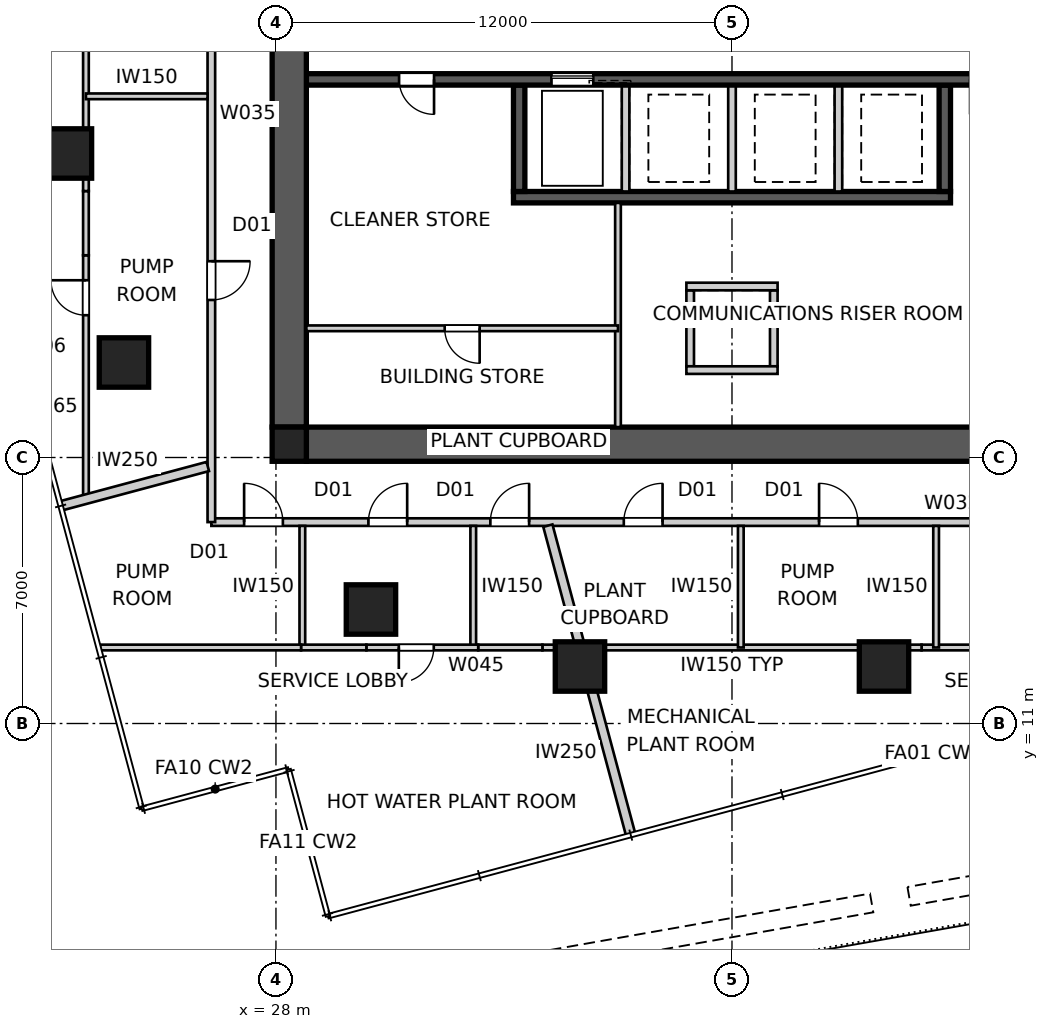
"""IFC4 building model, lengths in metres.
Left out: names, types, materials, properties, quantities, classifications, styles, units other than length and angle.
Written with IfcOpenShell. Run it as: python <this file> out.ifc"""

import sys

from ifc_helpers import new_model, si_unit, direction, frame, frame_2d, origin, origin_2d, place, context, subcontext, project, spatial, polyline, rectangle, outline, extrude, element, fill, save


model = new_model("IFC4")
c1 = context("Model", 3, precision=1e-05, world=origin(), true_north=direction((0.0, 1.0)))
c2 = subcontext(c1, "Body", "Model", "MODEL_VIEW")
j1 = project(units=[si_unit("LENGTHUNIT", "METRE"), si_unit("PLANEANGLEUNIT", "RADIAN")], contexts=[c1])
p1 = place(None, origin())
s1 = spatial("IfcSite", under=j1, at=p1, CompositionType="ELEMENT")
p2 = place(p1, origin())
s2 = spatial("IfcBuilding", under=s1, at=p2, CompositionType="ELEMENT")
p3 = place(p2, frame((0.0, 0.0, 106.6)))
s3 = spatial("IfcBuildingStorey", under=s2, at=p3, CompositionType="ELEMENT", Elevation=106.6)
p4 = place(p3, frame((51.2, 18.35, 0.0), z_axis=(0.0, 0.0, 1.0), x_axis=(-1.0, 0.0, 0.0)))
e1 = element("IfcWall", 1, at=p4, inside=s3, PredefinedType="SHEAR", context=c2, shape_type="SweptSolid", body=[
    extrude(outline(polyline([(0.0, -0.45), (22.4, -0.45), (22.4, -0.025), (22.85, -0.025), (22.85, 0.025), (22.4, 0.025), (22.4, 0.45), (0.0, 0.45), (0.0, 0.025), (-0.45, 0.025), (-0.45, -0.025), (0.0, -0.025), (0.0, -0.45)])), origin(), (0.0, 0.0, 1.0), 5.0),
])
p5 = place(p3, frame((28.35, 41.2, 0.0), z_axis=(0.0, 0.0, 1.0), x_axis=(0.0, -1.0, 0.0)))
e2 = element("IfcWall", 2, at=p5, inside=s3, PredefinedType="SHEAR", context=c2, shape_type="SweptSolid", body=[
    extrude(outline(polyline([(0.0, -0.45), (22.4, -0.45), (22.4, -0.025), (22.85, -0.025), (22.85, 0.025), (22.4, 0.025), (22.4, 0.45), (0.0, 0.45), (0.0, 0.025), (-0.45, 0.025), (-0.45, -0.025), (0.0, -0.025), (0.0, -0.45)])), origin(), (0.0, 0.0, 1.0), 5.0),
])
p6 = place(p5, frame((11.14, 0.0, 0.0)))
e3 = element("IfcOpeningElement", 3, at=p6, cuts=e2, PredefinedType="OPENING", context=c2, shape_type="SweptSolid", body=[
    extrude(rectangle(XDim=1.02, YDim=2.4, at=frame_2d((0.51, 1.2))), frame((0.0, 0.46, 0.0), z_axis=(0.0, -1.0, 0.0), x_axis=(1.0, 0.0, 0.0)), (0.0, 0.0, 1.0), 0.92),
])
p7 = place(p3, frame((51.2, 27.95, 0.0), z_axis=(0.0, 0.0, 1.0), x_axis=(-1.0, 0.0, 0.0)))
e4 = element("IfcWall", 4, at=p7, inside=s3, PredefinedType="SHEAR", context=c2, shape_type="SweptSolid", body=[
    extrude(rectangle(XDim=22.4, YDim=0.3, at=frame_2d((11.2, 0.0))), origin(), (0.0, 0.0, 1.0), 5.0),
])
p8 = place(p7, frame((19.04, 0.0, 0.0)))
e5 = element("IfcOpeningElement", 5, at=p8, cuts=e4, PredefinedType="OPENING", context=c2, shape_type="SweptSolid", body=[
    extrude(rectangle(XDim=0.92, YDim=2.1, at=frame_2d((0.46, 1.05))), frame((0.0, 0.16, 0.0), z_axis=(0.0, -1.0, 0.0), x_axis=(1.0, 0.0, 0.0)), (0.0, 0.0, 1.0), 0.32),
])
p9 = place(p7, frame((1.265, 0.0, 0.0)))
e6 = element("IfcOpeningElement", 6, at=p9, cuts=e4, PredefinedType="OPENING", context=c2, shape_type="SweptSolid", body=[
    extrude(rectangle(XDim=1.02, YDim=2.1, at=frame_2d((0.51, 1.05))), frame((0.0, 0.16, 0.0), z_axis=(0.0, -1.0, 0.0), x_axis=(1.0, 0.0, 0.0)), (0.0, 0.0, 1.0), 0.32),
])
p10 = place(p7, frame((4.015, 0.0, 0.0)))
e7 = element("IfcOpeningElement", 7, at=p10, cuts=e4, PredefinedType="OPENING", context=c2, shape_type="SweptSolid", body=[
    extrude(rectangle(XDim=0.92, YDim=2.1, at=frame_2d((0.46, 1.05))), frame((0.0, 0.16, 0.0), z_axis=(0.0, -1.0, 0.0), x_axis=(1.0, 0.0, 0.0)), (0.0, 0.0, 1.0), 0.32),
])
p11 = place(p7, frame((14.85, 0.0, 0.0)))
e8 = element("IfcOpeningElement", 8, at=p11, cuts=e4, PredefinedType="OPENING", context=c2, shape_type="SweptSolid", body=[
    extrude(rectangle(XDim=1.1, YDim=2.1, at=frame_2d((0.55, 1.05))), frame((0.0, 0.16, 0.0), z_axis=(0.0, -1.0, 0.0), x_axis=(1.0, 0.0, 0.0)), (0.0, 0.0, 1.0), 0.32),
])
p12 = place(p3, frame((45.75, 24.85, 0.0), z_axis=(0.0, 0.0, 1.0), x_axis=(-1.0, 0.0, 0.0)))
e9 = element("IfcWall", 9, at=p12, inside=s3, PredefinedType="SHEAR", context=c2, shape_type="SweptSolid", body=[
    extrude(rectangle(XDim=11.5, YDim=0.3, at=frame_2d((5.75, 0.0))), origin(), (0.0, 0.0, 1.0), 5.0),
])
p13 = place(p3, frame((45.6, 27.8, 0.0), z_axis=(0.0, 0.0, 1.0), x_axis=(0.0, -1.0, 0.0)))
e10 = element("IfcWall", 10, at=p13, inside=s3, PredefinedType="SHEAR", context=c2, shape_type="SweptSolid", body=[
    extrude(rectangle(XDim=2.8, YDim=0.3, at=frame_2d((1.4, 0.0))), origin(), (0.0, 0.0, 1.0), 5.0),
])
for number, where, z_axis, x_axis in (
    (11, (42.8, 27.8, 0.0), (0.0, 0.0, 1.0), (0.0, -1.0, 0.0)),
    (12, (40.0, 27.8, 0.0), (0.0, 0.0, 1.0), (0.0, -1.0, 0.0)),
    (13, (37.2, 27.8, 0.0), (0.0, 0.0, 1.0), (0.0, -1.0, 0.0)),
):
    element("IfcWall", number, at=place(p3, frame(where, z_axis=z_axis, x_axis=x_axis)), inside=s3, PredefinedType="SOLIDWALL", context=c2, shape_type="SweptSolid", body=[
        extrude(rectangle(XDim=2.8, YDim=0.2, at=frame_2d((1.4, 0.0))), origin(), (0.0, 0.0, 1.0), 5.0),
    ])
p14 = place(p3, frame((34.4, 27.8, 0.0), z_axis=(0.0, 0.0, 1.0), x_axis=(0.0, -1.0, 0.0)))
e14 = element("IfcWall", 14, at=p14, inside=s3, PredefinedType="SHEAR", context=c2, shape_type="SweptSolid", body=[
    extrude(rectangle(XDim=2.8, YDim=0.3, at=frame_2d((1.4, 0.0))), origin(), (0.0, 0.0, 1.0), 5.0),
])
for number, where, z_axis, x_axis in (
    (15, (38.9, 22.4, 0.0), (0.0, 0.0, 1.0), (0.0, -1.0, 0.0)),
    (16, (41.1, 22.4, 0.0), (0.0, 0.0, 1.0), (0.0, -1.0, 0.0)),
):
    element("IfcWall", number, at=place(p3, frame(where, z_axis=z_axis, x_axis=x_axis)), inside=s3, PredefinedType="SOLIDWALL", context=c2, shape_type="SweptSolid", body=[
        extrude(rectangle(XDim=2.0, YDim=0.2, at=frame_2d((1.0, 0.0))), origin(), (0.0, 0.0, 1.0), 5.0),
    ])
for number, where, z_axis, x_axis in (
    (17, (38.8, 22.5, 0.0), (0.0, 0.0, 1.0), (1.0, 0.0, 0.0)),
    (18, (38.8, 20.3, 0.0), (0.0, 0.0, 1.0), (1.0, 0.0, 0.0)),
):
    element("IfcWall", number, at=place(p3, frame(where, z_axis=z_axis, x_axis=x_axis)), inside=s3, PredefinedType="SOLIDWALL", context=c2, shape_type="SweptSolid", body=[
        extrude(rectangle(XDim=2.4, YDim=0.2, at=frame_2d((1.2, 0.0))), origin(), (0.0, 0.0, 1.0), 5.0),
    ])
p15 = place(p3, frame((28.35, 18.35, 0.0), z_axis=(0.0, 0.0, 1.0), x_axis=(1.0, 0.0, 0.0)))
e19 = element("IfcColumn", 19, at=p15, inside=s3, PredefinedType="COLUMN", context=c2, shape_type="SweptSolid", body=[
    extrude(rectangle(XDim=0.9, YDim=0.9, at=origin_2d()), origin(), (0.0, 0.0, 1.0), 5.0),
])
for number, where, z_axis, x_axis in (
    (20, (22.5, 26.0, 0.0), (0.0, 0.0, 1.0), (1.0, 0.0, 0.0)),
    (21, (24.0, 20.5, 0.0), (0.0, 0.0, 1.0), (1.0, 0.0, 0.0)),
    (22, (30.5, 14.0, 0.0), (0.0, 0.0, 1.0), (1.0, 0.0, 0.0)),
    (23, (36.0, 12.5, 0.0), (0.0, 0.0, 1.0), (1.0, 0.0, 0.0)),
    (24, (44.0, 12.5, 0.0), (0.0, 0.0, 1.0), (1.0, 0.0, 0.0)),
):
    element("IfcColumn", number, at=place(p3, frame(where, z_axis=z_axis, x_axis=x_axis)), inside=s3, PredefinedType="COLUMN", context=c2, shape_type="SweptSolid", body=[
        extrude(rectangle(XDim=1.3, YDim=1.3, at=origin_2d()), origin(), (0.0, 0.0, 1.0), 5.0),
    ])
p16 = place(p3, frame((26.3, 16.3, 0.0), z_axis=(0.0, 0.0, 1.0), x_axis=(1.0, 0.0, 0.0)))
e25 = element("IfcWall", 25, at=p16, inside=s3, PredefinedType="PARTITIONING", context=c2, shape_type="SweptSolid", body=[
    extrude(rectangle(XDim=27.4, YDim=0.2, at=frame_2d((13.7, 0.0))), origin(), (0.0, 0.0, 1.0), 4.85),
])
p17 = place(p16, frame((21.972, 0.0, 0.0)))
e26 = element("IfcOpeningElement", 26, at=p17, cuts=e25, PredefinedType="OPENING", context=c2, shape_type="SweptSolid", body=[
    extrude(rectangle(XDim=1.02, YDim=2.34, at=frame_2d((0.51, 1.17))), frame((0.0, 0.11, 0.0), z_axis=(0.0, -1.0, 0.0), x_axis=(1.0, 0.0, 0.0)), (0.0, 0.0, 1.0), 0.22),
])
p18 = place(p16, frame((15.991, 0.0, 0.0)))
e27 = element("IfcOpeningElement", 27, at=p18, cuts=e25, PredefinedType="OPENING", context=c2, shape_type="SweptSolid", body=[
    extrude(rectangle(XDim=1.02, YDim=2.34, at=frame_2d((0.51, 1.17))), frame((0.0, 0.11, 0.0), z_axis=(0.0, -1.0, 0.0), x_axis=(1.0, 0.0, 0.0)), (0.0, 0.0, 1.0), 0.22),
])
p19 = place(p16, frame((10.853, 0.0, 0.0)))
e28 = element("IfcOpeningElement", 28, at=p19, cuts=e25, PredefinedType="OPENING", context=c2, shape_type="SweptSolid", body=[
    extrude(rectangle(XDim=1.02, YDim=2.34, at=frame_2d((0.51, 1.17))), frame((0.0, 0.11, 0.0), z_axis=(0.0, -1.0, 0.0), x_axis=(1.0, 0.0, 0.0)), (0.0, 0.0, 1.0), 0.22),
])
p20 = place(p16, frame((4.133, 0.0, 0.0)))
e29 = element("IfcOpeningElement", 29, at=p20, cuts=e25, PredefinedType="OPENING", context=c2, shape_type="SweptSolid", body=[
    extrude(rectangle(XDim=1.02, YDim=2.34, at=frame_2d((0.51, 1.17))), frame((0.0, 0.11, 0.0), z_axis=(0.0, -1.0, 0.0), x_axis=(1.0, 0.0, 0.0)), (0.0, 0.0, 1.0), 0.22),
])
p21 = place(p16, frame((0.862, 0.0, 0.0)))
e30 = element("IfcOpeningElement", 30, at=p21, cuts=e25, PredefinedType="OPENING", context=c2, shape_type="SweptSolid", body=[
    extrude(rectangle(XDim=1.02, YDim=2.34, at=frame_2d((0.51, 1.17))), frame((0.0, 0.11, 0.0), z_axis=(0.0, -1.0, 0.0), x_axis=(1.0, 0.0, 0.0)), (0.0, 0.0, 1.0), 0.22),
])
p22 = place(p16, frame((7.342, 0.0, 0.0)))
e31 = element("IfcOpeningElement", 31, at=p22, cuts=e25, PredefinedType="OPENING", context=c2, shape_type="SweptSolid", body=[
    extrude(rectangle(XDim=1.02, YDim=2.34, at=frame_2d((0.51, 1.17))), frame((0.0, 0.11, 0.0), z_axis=(0.0, -1.0, 0.0), x_axis=(1.0, 0.0, 0.0)), (0.0, 0.0, 1.0), 0.22),
])
p23 = place(p3, frame((26.3, 43.7, 0.0), z_axis=(0.0, 0.0, 1.0), x_axis=(0.0, -1.0, 0.0)))
e32 = element("IfcWall", 32, at=p23, inside=s3, PredefinedType="PARTITIONING", context=c2, shape_type="SweptSolid", body=[
    extrude(rectangle(XDim=27.4, YDim=0.2, at=frame_2d((13.7, 0.0))), origin(), (0.0, 0.0, 1.0), 4.85),
])
p24 = place(p23, frame((20.535, 0.0, 0.0)))
e33 = element("IfcOpeningElement", 33, at=p24, cuts=e32, PredefinedType="OPENING", context=c2, shape_type="SweptSolid", body=[
    extrude(rectangle(XDim=1.02, YDim=2.34, at=frame_2d((0.51, 1.17))), frame((0.0, 0.11, 0.0), z_axis=(0.0, -1.0, 0.0), x_axis=(1.0, 0.0, 0.0)), (0.0, 0.0, 1.0), 0.22),
])
p25 = place(p23, frame((3.856, 0.0, 0.0)))
e34 = element("IfcOpeningElement", 34, at=p25, cuts=e32, PredefinedType="OPENING", context=c2, shape_type="SweptSolid", body=[
    extrude(rectangle(XDim=1.02, YDim=2.34, at=frame_2d((0.51, 1.17))), frame((0.0, 0.11, 0.0), z_axis=(0.0, -1.0, 0.0), x_axis=(1.0, 0.0, 0.0)), (0.0, 0.0, 1.0), 0.22),
])
p26 = place(p23, frame((11.779, 0.0, 0.0)))
e35 = element("IfcOpeningElement", 35, at=p26, cuts=e32, PredefinedType="OPENING", context=c2, shape_type="SweptSolid", body=[
    extrude(rectangle(XDim=1.02, YDim=2.34, at=frame_2d((0.51, 1.17))), frame((0.0, 0.11, 0.0), z_axis=(0.0, -1.0, 0.0), x_axis=(1.0, 0.0, 0.0)), (0.0, 0.0, 1.0), 0.22),
])
p27 = place(p3, frame((37.337, 8.063, 0.0), z_axis=(0.0, 0.0, 1.0), x_axis=(-0.25881425273, 0.965927110389, 0.0)))
e36 = element("IfcWall", 36, at=p27, inside=s3, PredefinedType="PARTITIONING", context=c2, shape_type="SweptSolid", body=[
    extrude(rectangle(XDim=8.43, YDim=0.25, at=frame_2d((4.215, 0.0))), origin(), (0.0, 0.0, 1.0), 4.85),
])
p28 = place(p3, frame((22.334, 16.725, 0.0), z_axis=(0.0, 0.0, 1.0), x_axis=(0.96592902462, 0.258807108475, 0.0)))
e37 = element("IfcWall", 37, at=p28, inside=s3, PredefinedType="PARTITIONING", context=c2, shape_type="SweptSolid", body=[
    extrude(rectangle(XDim=4.009, YDim=0.25, at=frame_2d((2.004, 0.0))), origin(), (0.0, 0.0, 1.0), 4.85),
])
p29 = place(p3, frame((37.0, 18.8, 0.0), z_axis=(0.0, 0.0, 1.0), x_axis=(0.0, 1.0, 0.0)))
e38 = element("IfcWall", 38, at=p29, inside=s3, PredefinedType="SOLIDWALL", context=c2, shape_type="SweptSolid", body=[
    extrude(rectangle(XDim=5.9, YDim=0.15, at=frame_2d((2.95, 0.0))), origin(), (0.0, 0.0, 1.0), 4.85),
])
p30 = place(p3, frame((37.0, 21.4, 0.0), z_axis=(0.0, 0.0, 1.0), x_axis=(-1.0, 0.0, 0.0)))
e39 = element("IfcWall", 39, at=p30, inside=s3, PredefinedType="SOLIDWALL", context=c2, shape_type="SweptSolid", body=[
    extrude(rectangle(XDim=8.2, YDim=0.15, at=frame_2d((4.1, 0.0))), origin(), (0.0, 0.0, 1.0), 4.85),
])
p31 = place(p30, frame((3.64, 0.0, 0.0)))
e40 = element("IfcOpeningElement", 40, at=p31, cuts=e39, PredefinedType="OPENING", context=c2, shape_type="SweptSolid", body=[
    extrude(rectangle(XDim=0.92, YDim=2.1, at=frame_2d((0.46, 1.05))), frame((0.0, 0.085, 0.0), z_axis=(0.0, -1.0, 0.0), x_axis=(1.0, 0.0, 0.0)), (0.0, 0.0, 1.0), 0.17),
])
for number, where, z_axis, x_axis in (
    (41, (28.695, 13.0, 0.0), (0.0, 0.0, 1.0), (0.0, 1.0, 0.0)),
    (42, (33.191, 16.2, 0.0), (0.0, 0.0, 1.0), (0.0, -1.0, 0.0)),
):
    element("IfcWall", number, at=place(p3, frame(where, z_axis=z_axis, x_axis=x_axis)), inside=s3, PredefinedType="SOLIDWALL", context=c2, shape_type="SweptSolid", body=[
        extrude(rectangle(XDim=3.2, YDim=0.15, at=frame_2d((1.6, 0.0))), origin(), (0.0, 0.0, 1.0), 4.85),
    ])
p32 = place(p3, frame((46.678, 13.0, 0.0), z_axis=(0.0, 0.0, 1.0), x_axis=(-1.0, 0.0, 0.0)))
e43 = element("IfcWall", 43, at=p32, inside=s3, PredefinedType="SOLIDWALL", context=c2, shape_type="SweptSolid", body=[
    extrude(rectangle(XDim=1.69, YDim=0.15, at=frame_2d((0.845, 0.0))), origin(), (0.0, 0.0, 1.0), 3.85),
])
p33 = place(p3, frame((44.988, 13.0, 0.0), z_axis=(0.0, 0.0, 1.0), x_axis=(-1.0, 0.0, 0.0)))
e44 = element("IfcWall", 44, at=p33, inside=s3, PredefinedType="SOLIDWALL", context=c2, shape_type="SweptSolid", body=[
    extrude(rectangle(XDim=9.977, YDim=0.15, at=frame_2d((4.988, 0.0))), origin(), (0.0, 0.0, 1.0), 4.85),
])
p34 = place(p3, frame((35.012, 13.0, 0.0), z_axis=(0.0, 0.0, 1.0), x_axis=(-1.0, 0.0, 0.0)))
e45 = element("IfcWall", 45, at=p34, inside=s3, PredefinedType="SOLIDWALL", context=c2, shape_type="SweptSolid", body=[
    extrude(rectangle(XDim=1.69, YDim=0.15, at=frame_2d((0.845, 0.0))), origin(), (0.0, 0.0, 1.0), 3.85),
])
p35 = place(p3, frame((33.322, 13.0, 0.0), z_axis=(0.0, 0.0, 1.0), x_axis=(-1.0, 0.0, 0.0)))
e46 = element("IfcWall", 46, at=p35, inside=s3, PredefinedType="SOLIDWALL", context=c2, shape_type="SweptSolid", body=[
    extrude(rectangle(XDim=2.942, YDim=0.15, at=frame_2d((1.471, 0.0))), origin(), (0.0, 0.0, 1.0), 4.85),
])
p36 = place(p35, frame((1.169, 0.0, 0.0)))
e47 = element("IfcOpeningElement", 47, at=p36, cuts=e46, PredefinedType="OPENING", context=c2, shape_type="SweptSolid", body=[
    extrude(rectangle(XDim=0.92, YDim=2.1, at=frame_2d((0.46, 1.05))), frame((0.0, 0.085, 0.0), z_axis=(0.0, -1.0, 0.0), x_axis=(1.0, 0.0, 0.0)), (0.0, 0.0, 1.0), 0.17),
])
p37 = place(p3, frame((30.38, 13.0, 0.0), z_axis=(0.0, 0.0, 1.0), x_axis=(-1.0, 0.0, 0.0)))
e48 = element("IfcWall", 48, at=p37, inside=s3, PredefinedType="SOLIDWALL", context=c2, shape_type="SweptSolid", body=[
    extrude(rectangle(XDim=1.719, YDim=0.15, at=frame_2d((0.859, 0.0))), origin(), (0.0, 0.0, 1.0), 4.049),
])
p38 = place(p3, frame((28.661, 13.0, 0.0), z_axis=(0.0, 0.0, 1.0), x_axis=(-1.0, 0.0, 0.0)))
e49 = element("IfcWall", 49, at=p38, inside=s3, PredefinedType="SOLIDWALL", context=c2, shape_type="SweptSolid", body=[
    extrude(rectangle(XDim=5.287, YDim=0.15, at=frame_2d((2.644, 0.0))), origin(), (0.0, 0.0, 1.0), 4.85),
])
for number, where, z_axis, x_axis in (
    (50, (45.371, 13.0, 0.0), (0.0, 0.0, 1.0), (0.0, 1.0, 0.0)),
    (51, (40.232, 13.0, 0.0), (0.0, 0.0, 1.0), (0.0, 1.0, 0.0)),
):
    element("IfcWall", number, at=place(p3, frame(where, z_axis=z_axis, x_axis=x_axis)), inside=s3, PredefinedType="SOLIDWALL", context=c2, shape_type="SweptSolid", body=[
        extrude(rectangle(XDim=3.2, YDim=0.15, at=frame_2d((1.6, 0.0))), origin(), (0.0, 0.0, 1.0), 4.85),
    ])
p39 = place(p3, frame((23.0, 16.904, 0.0), z_axis=(0.0, 0.0, 1.0), x_axis=(0.0, 1.0, 0.0)))
e52 = element("IfcWall", 52, at=p39, inside=s3, PredefinedType="SOLIDWALL", context=c2, shape_type="SweptSolid", body=[
    extrude(rectangle(XDim=6.418, YDim=0.15, at=frame_2d((3.209, 0.0))), origin(), (0.0, 0.0, 1.0), 4.85),
])
p40 = place(p39, frame((4.841, 0.0, 0.0)))
e53 = element("IfcOpeningElement", 53, at=p40, cuts=e52, PredefinedType="OPENING", context=c2, shape_type="SweptSolid", body=[
    extrude(rectangle(XDim=0.92, YDim=2.1, at=frame_2d((0.46, 1.05))), frame((0.0, 0.085, 0.0), z_axis=(0.0, -1.0, 0.0), x_axis=(1.0, 0.0, 0.0)), (0.0, 0.0, 1.0), 0.17),
])
p41 = place(p3, frame((23.0, 23.322, 0.0), z_axis=(0.0, 0.0, 1.0), x_axis=(0.0, 1.0, 0.0)))
e54 = element("IfcWall", 54, at=p41, inside=s3, PredefinedType="SOLIDWALL", context=c2, shape_type="SweptSolid", body=[
    extrude(rectangle(XDim=1.69, YDim=0.15, at=frame_2d((0.845, 0.0))), origin(), (0.0, 0.0, 1.0), 3.85),
])
p42 = place(p3, frame((23.0, 25.012, 0.0), z_axis=(0.0, 0.0, 1.0), x_axis=(0.0, 1.0, 0.0)))
e55 = element("IfcWall", 55, at=p42, inside=s3, PredefinedType="SOLIDWALL", context=c2, shape_type="SweptSolid", body=[
    extrude(rectangle(XDim=9.977, YDim=0.15, at=frame_2d((4.988, 0.0))), origin(), (0.0, 0.0, 1.0), 4.85),
])
p43 = place(p3, frame((23.0, 27.505, 0.0), z_axis=(0.0, 0.0, 1.0), x_axis=(1.0, 0.0, 0.0)))
e56 = element("IfcWall", 56, at=p43, inside=s3, PredefinedType="SOLIDWALL", context=c2, shape_type="SweptSolid", body=[
    extrude(rectangle(XDim=3.2, YDim=0.15, at=frame_2d((1.6, 0.0))), origin(), (0.0, 0.0, 1.0), 4.85),
])
p44 = place(p8, origin())
e57 = element("IfcDoor", 57, at=p44, inside=s3, OperationType="SINGLE_SWING_LEFT", PredefinedType="DOOR", context=c2, shape_type="SweptSolid", body=[
    extrude(rectangle(XDim=0.92, YDim=2.1, at=frame_2d((0.46, 1.05))), frame((0.0, 0.025, 0.0), z_axis=(0.0, -1.0, 0.0), x_axis=(1.0, 0.0, 0.0)), (0.0, 0.0, 1.0), 0.05),
])
fill(e5, e57)
p45 = place(p24, origin())
e58 = element("IfcDoor", 58, at=p45, inside=s3, OperationType="SINGLE_SWING_LEFT", PredefinedType="DOOR", context=c2, shape_type="SweptSolid", body=[
    extrude(rectangle(XDim=1.02, YDim=2.34, at=frame_2d((0.51, 1.17))), frame((0.0, 0.025, 0.0), z_axis=(0.0, -1.0, 0.0), x_axis=(1.0, 0.0, 0.0)), (0.0, 0.0, 1.0), 0.05),
])
fill(e33, e58)
p46 = place(p18, origin())
e59 = element("IfcDoor", 59, at=p46, inside=s3, OperationType="SINGLE_SWING_LEFT", PredefinedType="DOOR", context=c2, shape_type="SweptSolid", body=[
    extrude(rectangle(XDim=1.02, YDim=2.34, at=frame_2d((0.51, 1.17))), frame((0.0, 0.025, 0.0), z_axis=(0.0, -1.0, 0.0), x_axis=(1.0, 0.0, 0.0)), (0.0, 0.0, 1.0), 0.05),
])
fill(e27, e59)
p47 = place(p19, origin())
e60 = element("IfcDoor", 60, at=p47, inside=s3, OperationType="SINGLE_SWING_RIGHT", PredefinedType="DOOR", context=c2, shape_type="SweptSolid", body=[
    extrude(rectangle(XDim=1.02, YDim=2.34, at=frame_2d((0.51, 1.17))), frame((0.0, 0.025, 0.0), z_axis=(0.0, -1.0, 0.0), x_axis=(1.0, 0.0, 0.0)), (0.0, 0.0, 1.0), 0.05),
])
fill(e28, e60)
p48 = place(p20, origin())
e61 = element("IfcDoor", 61, at=p48, inside=s3, OperationType="SINGLE_SWING_RIGHT", PredefinedType="DOOR", context=c2, shape_type="SweptSolid", body=[
    extrude(rectangle(XDim=1.02, YDim=2.34, at=frame_2d((0.51, 1.17))), frame((0.0, 0.025, 0.0), z_axis=(0.0, -1.0, 0.0), x_axis=(1.0, 0.0, 0.0)), (0.0, 0.0, 1.0), 0.05),
])
fill(e29, e61)
p49 = place(p21, origin())
e62 = element("IfcDoor", 62, at=p49, inside=s3, OperationType="SINGLE_SWING_LEFT", PredefinedType="DOOR", context=c2, shape_type="SweptSolid", body=[
    extrude(rectangle(XDim=1.02, YDim=2.34, at=frame_2d((0.51, 1.17))), frame((0.0, 0.025, 0.0), z_axis=(0.0, -1.0, 0.0), x_axis=(1.0, 0.0, 0.0)), (0.0, 0.0, 1.0), 0.05),
])
fill(e30, e62)
p50 = place(p22, origin())
e63 = element("IfcDoor", 63, at=p50, inside=s3, OperationType="SINGLE_SWING_RIGHT", PredefinedType="DOOR", context=c2, shape_type="SweptSolid", body=[
    extrude(rectangle(XDim=1.02, YDim=2.34, at=frame_2d((0.51, 1.17))), frame((0.0, 0.025, 0.0), z_axis=(0.0, -1.0, 0.0), x_axis=(1.0, 0.0, 0.0)), (0.0, 0.0, 1.0), 0.05),
])
fill(e31, e63)
p51 = place(p31, origin())
e64 = element("IfcDoor", 64, at=p51, inside=s3, OperationType="SINGLE_SWING_LEFT", PredefinedType="DOOR", context=c2, shape_type="SweptSolid", body=[
    extrude(rectangle(XDim=0.92, YDim=2.1, at=frame_2d((0.46, 1.05))), frame((0.0, 0.025, 0.0), z_axis=(0.0, -1.0, 0.0), x_axis=(1.0, 0.0, 0.0)), (0.0, 0.0, 1.0), 0.05),
])
fill(e40, e64)
p52 = place(p40, origin())
e65 = element("IfcDoor", 65, at=p52, inside=s3, OperationType="SINGLE_SWING_RIGHT", PredefinedType="DOOR", context=c2, shape_type="SweptSolid", body=[
    extrude(rectangle(XDim=0.92, YDim=2.1, at=frame_2d((0.46, 1.05))), frame((0.0, 0.025, 0.0), z_axis=(0.0, -1.0, 0.0), x_axis=(1.0, 0.0, 0.0)), (0.0, 0.0, 1.0), 0.05),
])
fill(e53, e65)
p53 = place(p36, origin())
e66 = element("IfcDoor", 66, at=p53, inside=s3, OperationType="SINGLE_SWING_RIGHT", PredefinedType="DOOR", context=c2, shape_type="SweptSolid", body=[
    extrude(rectangle(XDim=0.92, YDim=2.1, at=frame_2d((0.46, 1.05))), frame((0.0, 0.025, 0.0), z_axis=(0.0, -1.0, 0.0), x_axis=(1.0, 0.0, 0.0)), (0.0, 0.0, 1.0), 0.05),
])
fill(e47, e66)
p54 = place(p11, origin())
e67 = element("IfcDoor", 67, at=p54, inside=s3, OperationType="SLIDING_TO_LEFT", PredefinedType="DOOR", context=c2, shape_type="SweptSolid", body=[
    extrude(rectangle(XDim=1.1, YDim=2.1, at=frame_2d((0.55, 1.05))), frame((0.0, 0.025, 0.0), z_axis=(0.0, -1.0, 0.0), x_axis=(1.0, 0.0, 0.0)), (0.0, 0.0, 1.0), 0.05),
])
fill(e8, e67)
save(model, sys.argv[1])
